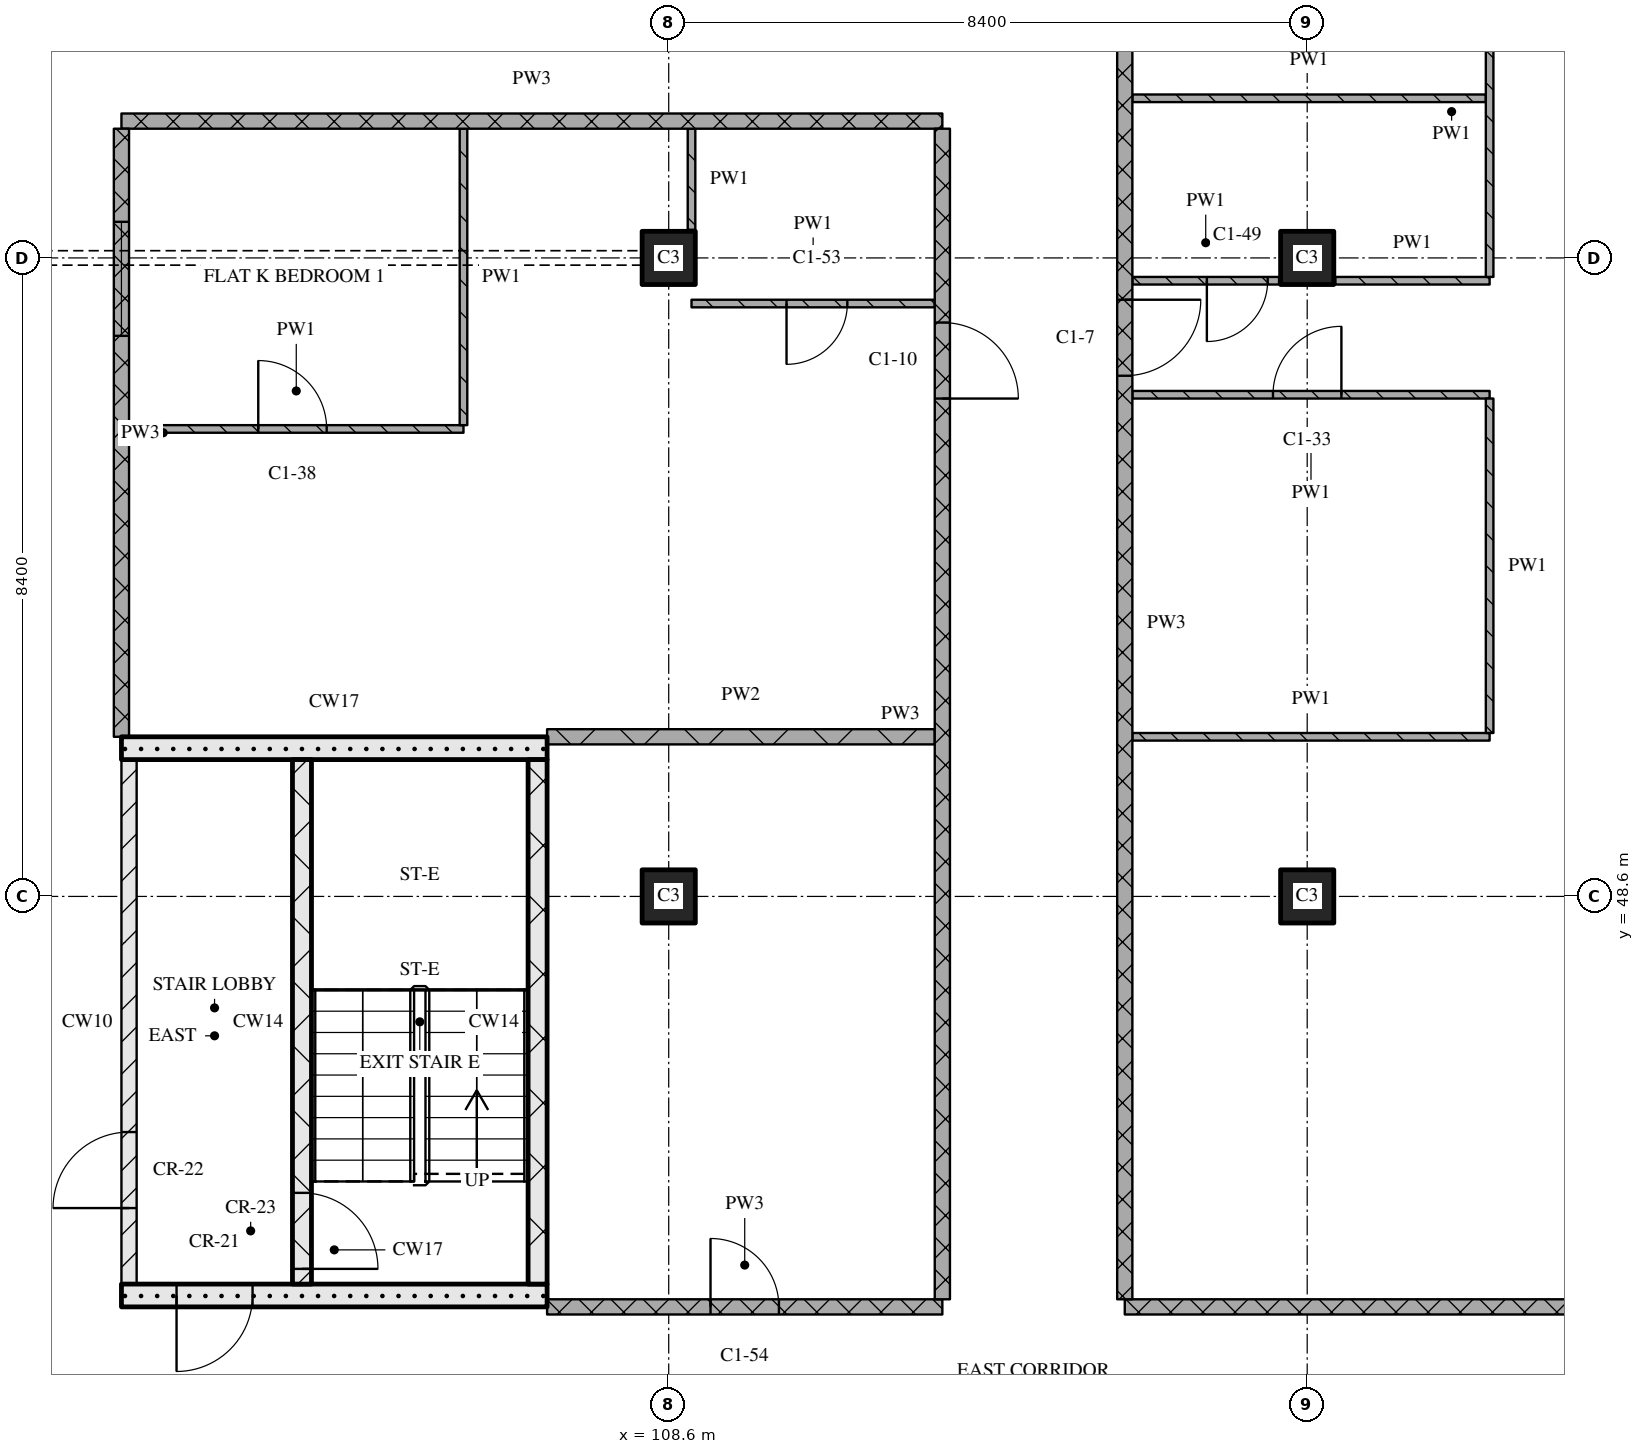
"""IFC4 building model, lengths in metres.
Left out: names, types, materials, properties, quantities, classifications, styles, units other than length and angle.
Written with IfcOpenShell. Run it as: python <this file> out.ifc"""

import sys

from ifc_helpers import new_model, si_unit, direction, frame, frame_2d, origin, origin_2d, place, context, subcontext, project, spatial, rectangle, extrude, element, fill, save


model = new_model("IFC4")
c1 = context("Model", 3, precision=1e-05, world=origin(), true_north=direction((0.0, 1.0)))
c2 = subcontext(c1, "Body", "Model", "MODEL_VIEW")
j1 = project(units=[si_unit("LENGTHUNIT", "METRE"), si_unit("PLANEANGLEUNIT", "RADIAN")], contexts=[c1])
p1 = place(None, origin())
s1 = spatial("IfcSite", under=j1, at=p1, CompositionType="ELEMENT")
p2 = place(p1, origin())
s2 = spatial("IfcBuilding", under=s1, at=p2, CompositionType="ELEMENT")
p3 = place(p2, frame((0.0, 0.0, 151.05)))
s3 = spatial("IfcBuildingStorey", under=s2, at=p3, CompositionType="ELEMENT", Elevation=151.05)
for number, where, z_axis, x_axis in (
    (1, (108.6, 48.6, 0.0), (0.0, 0.0, 1.0), (1.0, 0.0, 0.0)),
    (2, (108.6, 57.0, 0.0), (0.0, 0.0, 1.0), (1.0, 0.0, 0.0)),
    (3, (117.0, 48.6, 0.0), (0.0, 0.0, 1.0), (1.0, 0.0, 0.0)),
    (4, (117.0, 57.0, 0.0), (0.0, 0.0, 1.0), (1.0, 0.0, 0.0)),
):
    element("IfcColumn", number, at=place(p3, frame(where, z_axis=z_axis, x_axis=x_axis)), inside=s3, PredefinedType="COLUMN", context=c2, shape_type="SweptSolid", body=[
        extrude(rectangle(XDim=0.7, YDim=0.7, at=origin_2d()), origin(), (0.0, 0.0, 1.0), 3.6),
    ])
p4 = place(p3, frame((101.4, 43.35, 0.0), z_axis=(0.0, 0.0, 1.0), x_axis=(1.0, 0.0, 0.0)))
e5 = element("IfcWall", 5, at=p4, inside=s3, PredefinedType="SOLIDWALL", context=c2, shape_type="SweptSolid", body=[
    extrude(rectangle(XDim=5.6, YDim=0.3, at=frame_2d((2.8, 0.0))), origin(), (0.0, 0.0, 1.0), 3.32),
])
p5 = place(p4, frame((0.725, 0.0, 0.0)))
e6 = element("IfcOpeningElement", 6, at=p5, cuts=e5, PredefinedType="OPENING", context=c2, shape_type="SweptSolid", body=[
    extrude(rectangle(XDim=1.0, YDim=2.1, at=frame_2d((0.5, 1.05))), frame((0.0, 0.16, 0.0), z_axis=(0.0, -1.0, 0.0), x_axis=(1.0, 0.0, 0.0)), (0.0, 0.0, 1.0), 0.32),
])
p6 = place(p3, frame((101.5, 43.5, 0.0), z_axis=(0.0, 0.0, 1.0), x_axis=(0.0, 1.0, 0.0)))
e7 = element("IfcWall", 7, at=p6, inside=s3, PredefinedType="PARTITIONING", context=c2, shape_type="SweptSolid", body=[
    extrude(rectangle(XDim=6.9, YDim=0.2, at=frame_2d((3.45, 0.0))), origin(), (0.0, 0.0, 1.0), 3.32),
])
p7 = place(p6, frame((1.0, 0.0, 0.0)))
e8 = element("IfcOpeningElement", 8, at=p7, cuts=e7, PredefinedType="OPENING", context=c2, shape_type="SweptSolid", body=[
    extrude(rectangle(XDim=1.0, YDim=2.1, at=frame_2d((0.5, 1.05))), frame((0.0, 0.11, 0.0), z_axis=(0.0, -1.0, 0.0), x_axis=(1.0, 0.0, 0.0)), (0.0, 0.0, 1.0), 0.22),
])
p8 = place(p3, frame((103.775, 43.5, 0.0), z_axis=(0.0, 0.0, 1.0), x_axis=(0.0, 1.0, 0.0)))
e9 = element("IfcWall", 9, at=p8, inside=s3, PredefinedType="SOLIDWALL", context=c2, shape_type="SweptSolid", body=[
    extrude(rectangle(XDim=6.9, YDim=0.25, at=frame_2d((3.45, 0.0))), origin(), (0.0, 0.0, 1.0), 3.32),
])
p9 = place(p8, frame((0.2, 0.0, 0.0)))
e10 = element("IfcOpeningElement", 10, at=p9, cuts=e9, PredefinedType="OPENING", context=c2, shape_type="SweptSolid", body=[
    extrude(rectangle(XDim=1.0, YDim=2.1, at=frame_2d((0.5, 1.05))), frame((0.0, 0.135, 0.0), z_axis=(0.0, -1.0, 0.0), x_axis=(1.0, 0.0, 0.0)), (0.0, 0.0, 1.0), 0.27),
])
p10 = place(p3, frame((106.875, 43.5, 0.0), z_axis=(0.0, 0.0, 1.0), x_axis=(0.0, 1.0, 0.0)))
e11 = element("IfcWall", 11, at=p10, inside=s3, PredefinedType="SOLIDWALL", context=c2, shape_type="SweptSolid", body=[
    extrude(rectangle(XDim=6.9, YDim=0.25, at=frame_2d((3.45, 0.0))), origin(), (0.0, 0.0, 1.0), 3.32),
])
p11 = place(p3, frame((101.4, 50.55, 0.0), z_axis=(0.0, 0.0, 1.0), x_axis=(1.0, 0.0, 0.0)))
e12 = element("IfcWall", 12, at=p11, inside=s3, PredefinedType="SOLIDWALL", context=c2, shape_type="SweptSolid", body=[
    extrude(rectangle(XDim=5.6, YDim=0.3, at=frame_2d((2.8, 0.0))), origin(), (0.0, 0.0, 1.0), 3.32),
])
p12 = place(p3, frame((107.0, 43.2, 0.0), z_axis=(0.0, 0.0, 1.0), x_axis=(1.0, 0.0, 0.0)))
e13 = element("IfcWall", 13, at=p12, inside=s3, PredefinedType="PARTITIONING", context=c2, shape_type="SweptSolid", body=[
    extrude(rectangle(XDim=5.2, YDim=0.2, at=frame_2d((2.6, 0.0))), origin(), (0.0, 0.0, 1.0), 3.32),
])
p13 = place(p12, frame((2.15, 0.0, 0.0)))
e14 = element("IfcOpeningElement", 14, at=p13, cuts=e13, PredefinedType="OPENING", context=c2, shape_type="SweptSolid", body=[
    extrude(rectangle(XDim=0.9, YDim=2.1, at=frame_2d((0.45, 1.05))), frame((0.0, 0.11, 0.0), z_axis=(0.0, -1.0, 0.0), x_axis=(1.0, 0.0, 0.0)), (0.0, 0.0, 1.0), 0.22),
])
p14 = place(p3, frame((114.6, 43.2, 0.0), z_axis=(0.0, 0.0, 1.0), x_axis=(1.0, 0.0, 0.0)))
e15 = element("IfcWall", 15, at=p14, inside=s3, PredefinedType="PARTITIONING", context=c2, shape_type="SweptSolid", body=[
    extrude(rectangle(XDim=12.32, YDim=0.2, at=frame_2d((6.16, 0.0))), origin(), (0.0, 0.0, 1.0), 3.32),
])
p15 = place(p3, frame((107.0, 50.7, 0.0), z_axis=(0.0, 0.0, 1.0), x_axis=(1.0, 0.0, 0.0)))
e16 = element("IfcWall", 16, at=p15, inside=s3, PredefinedType="PARTITIONING", context=c2, shape_type="SweptSolid", body=[
    extrude(rectangle(XDim=5.1, YDim=0.2, at=frame_2d((2.55, 0.0))), origin(), (0.0, 0.0, 1.0), 3.32),
])
p16 = place(p3, frame((114.7, 50.7, 0.0), z_axis=(0.0, 0.0, 1.0), x_axis=(1.0, 0.0, 0.0)))
e17 = element("IfcWall", 17, at=p16, inside=s3, PredefinedType="PARTITIONING", context=c2, shape_type="SweptSolid", body=[
    extrude(rectangle(XDim=4.7, YDim=0.1, at=frame_2d((2.35, 0.0))), origin(), (0.0, 0.0, 1.0), 3.32),
])
p17 = place(p3, frame((101.5, 54.75, 0.0), z_axis=(0.0, 0.0, 1.0), x_axis=(1.0, 0.0, 0.0)))
e18 = element("IfcWall", 18, at=p17, inside=s3, PredefinedType="PARTITIONING", context=c2, shape_type="SweptSolid", body=[
    extrude(rectangle(XDim=4.4, YDim=0.1, at=frame_2d((2.2, 0.0))), origin(), (0.0, 0.0, 1.0), 3.32),
])
p18 = place(p17, frame((1.7, 0.0, 0.0)))
e19 = element("IfcOpeningElement", 19, at=p18, cuts=e18, PredefinedType="OPENING", context=c2, shape_type="SweptSolid", body=[
    extrude(rectangle(XDim=0.9, YDim=2.1, at=frame_2d((0.45, 1.05))), frame((0.0, 0.06, 0.0), z_axis=(0.0, -1.0, 0.0), x_axis=(1.0, 0.0, 0.0)), (0.0, 0.0, 1.0), 0.12),
])
p19 = place(p3, frame((119.4, 55.2, 0.0), z_axis=(0.0, 0.0, 1.0), x_axis=(-1.0, 0.0, 0.0)))
e20 = element("IfcWall", 20, at=p19, inside=s3, PredefinedType="PARTITIONING", context=c2, shape_type="SweptSolid", body=[
    extrude(rectangle(XDim=4.7, YDim=0.1, at=frame_2d((2.35, 0.0))), origin(), (0.0, 0.0, 1.0), 3.32),
])
p20 = place(p19, frame((1.95, 0.0, 0.0)))
e21 = element("IfcOpeningElement", 21, at=p20, cuts=e20, PredefinedType="OPENING", context=c2, shape_type="SweptSolid", body=[
    extrude(rectangle(XDim=0.9, YDim=2.1, at=frame_2d((0.45, 1.05))), frame((0.0, 0.06, 0.0), z_axis=(0.0, -1.0, 0.0), x_axis=(1.0, 0.0, 0.0)), (0.0, 0.0, 1.0), 0.12),
])
p21 = place(p3, frame((108.9, 56.4, 0.0), z_axis=(0.0, 0.0, 1.0), x_axis=(1.0, 0.0, 0.0)))
e22 = element("IfcWall", 22, at=p21, inside=s3, PredefinedType="PARTITIONING", context=c2, shape_type="SweptSolid", body=[
    extrude(rectangle(XDim=3.2, YDim=0.1, at=frame_2d((1.6, 0.0))), origin(), (0.0, 0.0, 1.0), 3.32),
])
p22 = place(p21, frame((1.25, 0.0, 0.0)))
e23 = element("IfcOpeningElement", 23, at=p22, cuts=e22, PredefinedType="OPENING", context=c2, shape_type="SweptSolid", body=[
    extrude(rectangle(XDim=0.8, YDim=2.1, at=frame_2d((0.4, 1.05))), frame((0.0, 0.06, 0.0), z_axis=(0.0, -1.0, 0.0), x_axis=(1.0, 0.0, 0.0)), (0.0, 0.0, 1.0), 0.12),
])
p23 = place(p3, frame((114.7, 56.7, 0.0), z_axis=(0.0, 0.0, 1.0), x_axis=(1.0, 0.0, 0.0)))
e24 = element("IfcWall", 24, at=p23, inside=s3, PredefinedType="PARTITIONING", context=c2, shape_type="SweptSolid", body=[
    extrude(rectangle(XDim=1.93, YDim=0.1, at=frame_2d((0.965, 0.0))), origin(), (0.0, 0.0, 1.0), 3.32),
])
p24 = place(p23, frame((0.98, 0.0, 0.0)))
e25 = element("IfcOpeningElement", 25, at=p24, cuts=e24, PredefinedType="OPENING", context=c2, shape_type="SweptSolid", body=[
    extrude(rectangle(XDim=0.8, YDim=2.1, at=frame_2d((0.4, 1.05))), frame((0.0, 0.06, 0.0), z_axis=(0.0, -1.0, 0.0), x_axis=(1.0, 0.0, 0.0)), (0.0, 0.0, 1.0), 0.12),
])
p25 = place(p3, frame((117.37, 56.7, 0.0), z_axis=(0.0, 0.0, 1.0), x_axis=(1.0, 0.0, 0.0)))
e26 = element("IfcWall", 26, at=p25, inside=s3, PredefinedType="PARTITIONING", context=c2, shape_type="SweptSolid", body=[
    extrude(rectangle(XDim=2.03, YDim=0.1, at=frame_2d((1.015, 0.0))), origin(), (0.0, 0.0, 1.0), 3.32),
])
p26 = place(p3, frame((101.4, 58.8, 0.0), z_axis=(0.0, 0.0, 1.0), x_axis=(1.0, 0.0, 0.0)))
e27 = element("IfcWall", 27, at=p26, inside=s3, PredefinedType="PARTITIONING", context=c2, shape_type="SweptSolid", body=[
    extrude(rectangle(XDim=10.8, YDim=0.2, at=frame_2d((5.4, 0.0))), origin(), (0.0, 0.0, 1.0), 3.32),
])
p27 = place(p3, frame((114.7, 59.1, 0.0), z_axis=(0.0, 0.0, 1.0), x_axis=(1.0, 0.0, 0.0)))
e28 = element("IfcWall", 28, at=p27, inside=s3, PredefinedType="PARTITIONING", context=c2, shape_type="SweptSolid", body=[
    extrude(rectangle(XDim=4.65, YDim=0.1, at=frame_2d((2.325, 0.0))), origin(), (0.0, 0.0, 1.0), 3.32),
])
p28 = place(p3, frame((101.4, 58.7, 0.0), z_axis=(0.0, 0.0, 1.0), x_axis=(0.0, -1.0, 0.0)))
e29 = element("IfcWall", 29, at=p28, inside=s3, PredefinedType="PARTITIONING", context=c2, shape_type="SweptSolid", body=[
    extrude(rectangle(XDim=8.0, YDim=0.2, at=frame_2d((4.0, 0.0))), origin(), (0.0, 0.0, 1.0), 3.32),
])
p29 = place(p28, frame((1.225, 0.0, 0.9)))
e30 = element("IfcOpeningElement", 30, at=p29, cuts=e29, PredefinedType="OPENING", context=c2, shape_type="SweptSolid", body=[
    extrude(rectangle(XDim=1.5, YDim=1.5, at=frame_2d((0.75, 0.75))), frame((0.0, 0.11, 0.0), z_axis=(0.0, -1.0, 0.0), x_axis=(1.0, 0.0, 0.0)), (0.0, 0.0, 1.0), 0.22),
])
p30 = place(p3, frame((105.9, 58.7, 0.0), z_axis=(0.0, 0.0, 1.0), x_axis=(0.0, -1.0, 0.0)))
e31 = element("IfcWall", 31, at=p30, inside=s3, PredefinedType="PARTITIONING", context=c2, shape_type="SweptSolid", body=[
    extrude(rectangle(XDim=3.9, YDim=0.1, at=frame_2d((1.95, 0.0))), origin(), (0.0, 0.0, 1.0), 3.32),
])
p31 = place(p3, frame((108.9, 58.7, 0.0), z_axis=(0.0, 0.0, 1.0), x_axis=(0.0, -1.0, 0.0)))
e32 = element("IfcWall", 32, at=p31, inside=s3, PredefinedType="PARTITIONING", context=c2, shape_type="SweptSolid", body=[
    extrude(rectangle(XDim=1.33, YDim=0.1, at=frame_2d((0.665, 0.0))), origin(), (0.0, 0.0, 1.0), 3.32),
])
p32 = place(p3, frame((112.2, 43.3, 0.0), z_axis=(0.0, 0.0, 1.0), x_axis=(0.0, 1.0, 0.0)))
e33 = element("IfcWall", 33, at=p32, inside=s3, PredefinedType="PARTITIONING", context=c2, shape_type="SweptSolid", body=[
    extrude(rectangle(XDim=15.4, YDim=0.2, at=frame_2d((7.7, 0.0))), origin(), (0.0, 0.0, 1.0), 3.32),
])
p33 = place(p32, frame((11.85, 0.0, 0.0)))
e34 = element("IfcOpeningElement", 34, at=p33, cuts=e33, PredefinedType="OPENING", context=c2, shape_type="SweptSolid", body=[
    extrude(rectangle(XDim=1.0, YDim=2.1, at=frame_2d((0.5, 1.05))), frame((0.0, 0.11, 0.0), z_axis=(0.0, -1.0, 0.0), x_axis=(1.0, 0.0, 0.0)), (0.0, 0.0, 1.0), 0.22),
])
p34 = place(p3, frame((114.6, 61.1, 0.0), z_axis=(0.0, 0.0, 1.0), x_axis=(0.0, -1.0, 0.0)))
e35 = element("IfcWall", 35, at=p34, inside=s3, PredefinedType="PARTITIONING", context=c2, shape_type="SweptSolid", body=[
    extrude(rectangle(XDim=17.8, YDim=0.2, at=frame_2d((8.9, 0.0))), origin(), (0.0, 0.0, 1.0), 3.32),
])
p35 = place(p34, frame((4.65, 0.0, 0.0)))
e36 = element("IfcOpeningElement", 36, at=p35, cuts=e35, PredefinedType="OPENING", context=c2, shape_type="SweptSolid", body=[
    extrude(rectangle(XDim=1.0, YDim=2.1, at=frame_2d((0.5, 1.05))), frame((0.0, 0.11, 0.0), z_axis=(0.0, -1.0, 0.0), x_axis=(1.0, 0.0, 0.0)), (0.0, 0.0, 1.0), 0.22),
])
p36 = place(p3, frame((119.4, 55.15, 0.0), z_axis=(0.0, 0.0, 1.0), x_axis=(0.0, -1.0, 0.0)))
e37 = element("IfcWall", 37, at=p36, inside=s3, PredefinedType="PARTITIONING", context=c2, shape_type="SweptSolid", body=[
    extrude(rectangle(XDim=4.4, YDim=0.1, at=frame_2d((2.2, 0.0))), origin(), (0.0, 0.0, 1.0), 3.32),
])
p37 = place(p3, frame((119.4, 56.75, 0.0), z_axis=(0.0, 0.0, 1.0), x_axis=(0.0, 1.0, 0.0)))
e38 = element("IfcWall", 38, at=p37, inside=s3, PredefinedType="PARTITIONING", context=c2, shape_type="SweptSolid", body=[
    extrude(rectangle(XDim=4.35, YDim=0.1, at=frame_2d((2.175, 0.0))), origin(), (0.0, 0.0, 1.0), 3.32),
])
p38 = place(p37, frame((3.0, 0.0, 0.0)))
e39 = element("IfcOpeningElement", 39, at=p38, cuts=e38, PredefinedType="OPENING", context=c2, shape_type="SweptSolid", body=[
    extrude(rectangle(XDim=0.8, YDim=2.1, at=frame_2d((0.4, 1.05))), frame((0.0, 0.06, 0.0), z_axis=(0.0, -1.0, 0.0), x_axis=(1.0, 0.0, 0.0)), (0.0, 0.0, 1.0), 0.12),
])
p39 = place(p5, origin())
e40 = element("IfcDoor", 40, at=p39, inside=s3, OperationType="SINGLE_SWING_RIGHT", PredefinedType="DOOR", context=c2, shape_type="SweptSolid", body=[
    extrude(rectangle(XDim=1.0, YDim=2.1, at=frame_2d((0.5, 1.05))), frame((0.0, 0.025, 0.0), z_axis=(0.0, -1.0, 0.0), x_axis=(1.0, 0.0, 0.0)), (0.0, 0.0, 1.0), 0.05),
])
fill(e6, e40)
p40 = place(p9, origin())
e41 = element("IfcDoor", 41, at=p40, inside=s3, OperationType="SINGLE_SWING_RIGHT", PredefinedType="DOOR", context=c2, shape_type="SweptSolid", body=[
    extrude(rectangle(XDim=1.0, YDim=2.1, at=frame_2d((0.5, 1.05))), frame((0.0, 0.025, 0.0), z_axis=(0.0, -1.0, 0.0), x_axis=(1.0, 0.0, 0.0)), (0.0, 0.0, 1.0), 0.05),
])
fill(e10, e41)
p41 = place(p7, origin())
e42 = element("IfcDoor", 42, at=p41, inside=s3, OperationType="SINGLE_SWING_LEFT", PredefinedType="DOOR", context=c2, shape_type="SweptSolid", body=[
    extrude(rectangle(XDim=1.0, YDim=2.1, at=frame_2d((0.5, 1.05))), frame((0.0, 0.025, 0.0), z_axis=(0.0, -1.0, 0.0), x_axis=(1.0, 0.0, 0.0)), (0.0, 0.0, 1.0), 0.05),
])
fill(e8, e42)
p42 = place(p13, origin())
e43 = element("IfcDoor", 43, at=p42, inside=s3, OperationType="SINGLE_SWING_LEFT", PredefinedType="DOOR", context=c2, shape_type="SweptSolid", body=[
    extrude(rectangle(XDim=0.9, YDim=2.1, at=frame_2d((0.45, 1.05))), frame((0.0, 0.025, 0.0), z_axis=(0.0, -1.0, 0.0), x_axis=(1.0, 0.0, 0.0)), (0.0, 0.0, 1.0), 0.05),
])
fill(e14, e43)
p43 = place(p18, origin())
e44 = element("IfcDoor", 44, at=p43, inside=s3, OperationType="SINGLE_SWING_LEFT", PredefinedType="DOOR", context=c2, shape_type="SweptSolid", body=[
    extrude(rectangle(XDim=0.9, YDim=2.1, at=frame_2d((0.45, 1.05))), frame((0.0, 0.025, 0.0), z_axis=(0.0, -1.0, 0.0), x_axis=(1.0, 0.0, 0.0)), (0.0, 0.0, 1.0), 0.05),
])
fill(e19, e44)
p44 = place(p20, origin())
e45 = element("IfcDoor", 45, at=p44, inside=s3, OperationType="SINGLE_SWING_RIGHT", PredefinedType="DOOR", context=c2, shape_type="SweptSolid", body=[
    extrude(rectangle(XDim=0.9, YDim=2.1, at=frame_2d((0.45, 1.05))), frame((0.0, 0.025, 0.0), z_axis=(0.0, -1.0, 0.0), x_axis=(1.0, 0.0, 0.0)), (0.0, 0.0, 1.0), 0.05),
])
fill(e21, e45)
p45 = place(p22, origin())
e46 = element("IfcDoor", 46, at=p45, inside=s3, OperationType="SINGLE_SWING_RIGHT", PredefinedType="DOOR", context=c2, shape_type="SweptSolid", body=[
    extrude(rectangle(XDim=0.8, YDim=2.1, at=frame_2d((0.4, 1.05))), frame((0.0, 0.025, 0.0), z_axis=(0.0, -1.0, 0.0), x_axis=(1.0, 0.0, 0.0)), (0.0, 0.0, 1.0), 0.05),
])
fill(e23, e46)
p46 = place(p24, origin())
e47 = element("IfcDoor", 47, at=p46, inside=s3, OperationType="SINGLE_SWING_RIGHT", PredefinedType="DOOR", context=c2, shape_type="SweptSolid", body=[
    extrude(rectangle(XDim=0.8, YDim=2.1, at=frame_2d((0.4, 1.05))), frame((0.0, 0.025, 0.0), z_axis=(0.0, -1.0, 0.0), x_axis=(1.0, 0.0, 0.0)), (0.0, 0.0, 1.0), 0.05),
])
fill(e25, e47)
p47 = place(p33, origin())
e48 = element("IfcDoor", 48, at=p47, inside=s3, OperationType="SINGLE_SWING_RIGHT", PredefinedType="DOOR", context=c2, shape_type="SweptSolid", body=[
    extrude(rectangle(XDim=1.0, YDim=2.1, at=frame_2d((0.5, 1.05))), frame((0.0, 0.025, 0.0), z_axis=(0.0, -1.0, 0.0), x_axis=(1.0, 0.0, 0.0)), (0.0, 0.0, 1.0), 0.05),
])
fill(e34, e48)
p48 = place(p35, origin())
e49 = element("IfcDoor", 49, at=p48, inside=s3, OperationType="SINGLE_SWING_LEFT", PredefinedType="DOOR", context=c2, shape_type="SweptSolid", body=[
    extrude(rectangle(XDim=1.0, YDim=2.1, at=frame_2d((0.5, 1.05))), frame((0.0, 0.025, 0.0), z_axis=(0.0, -1.0, 0.0), x_axis=(1.0, 0.0, 0.0)), (0.0, 0.0, 1.0), 0.05),
])
fill(e36, e49)
p49 = place(p29, origin())
e50 = element("IfcWindow", 50, at=p49, inside=s3, PartitioningType="SINGLE_PANEL", PredefinedType="WINDOW", context=c2, shape_type="SweptSolid", body=[
    extrude(rectangle(XDim=1.5, YDim=1.5, at=frame_2d((0.75, 0.75))), frame((0.0, 0.03, 0.0), z_axis=(0.0, -1.0, 0.0), x_axis=(1.0, 0.0, 0.0)), (0.0, 0.0, 1.0), 0.06),
])
fill(e30, e50)
save(model, sys.argv[1])
